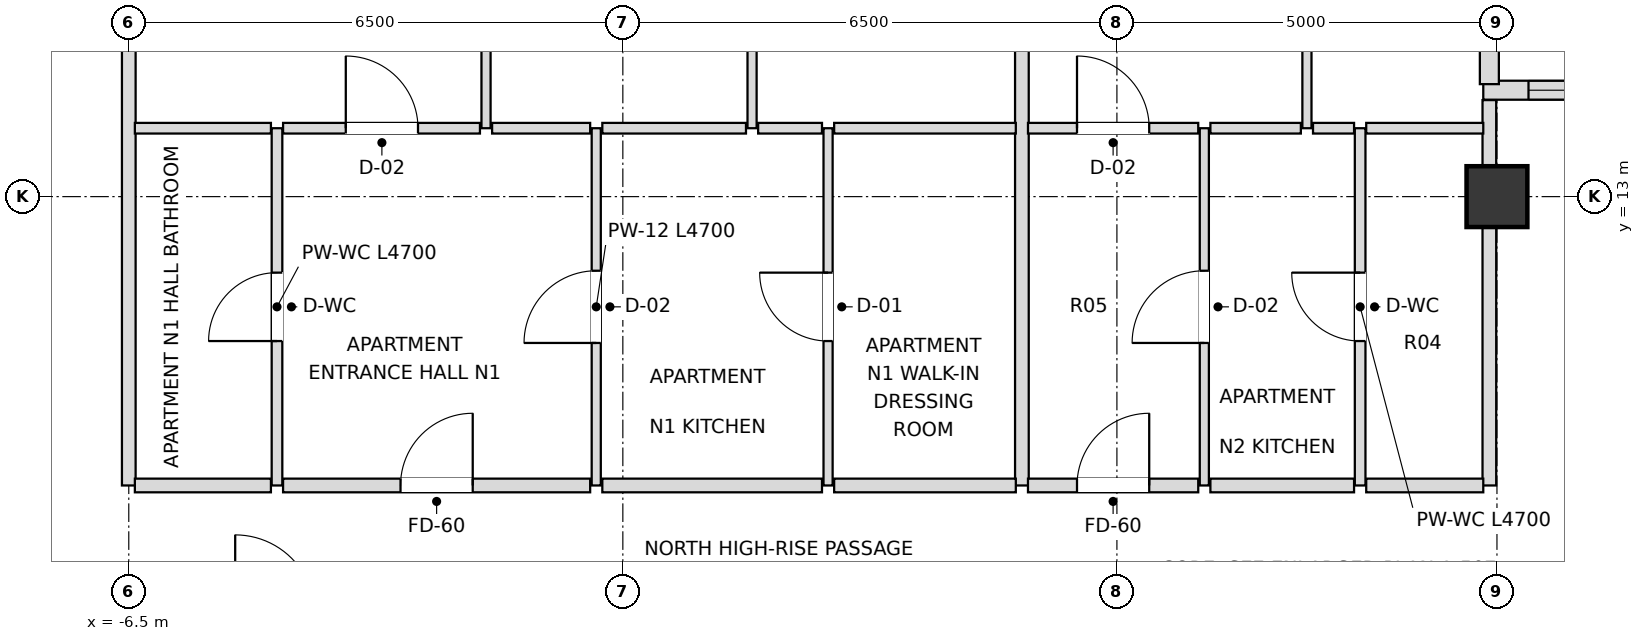
"""IFC4 building model, lengths in metres.
Left out: names, types, materials, properties, quantities, classifications, styles, units other than length and angle.
Written with IfcOpenShell. Run it as: python <this file> out.ifc"""

import sys

from ifc_helpers import new_model, si_unit, direction, frame, frame_2d, origin, origin_2d, place, context, subcontext, project, spatial, rectangle, extrude, element, fill, save


model = new_model("IFC4")
c1 = context("Model", 3, precision=1e-05, world=origin(), true_north=direction((0.0, 1.0)))
c2 = subcontext(c1, "Body", "Model", "MODEL_VIEW")
j1 = project(units=[si_unit("LENGTHUNIT", "METRE"), si_unit("PLANEANGLEUNIT", "RADIAN")], contexts=[c1])
p1 = place(None, origin())
s1 = spatial("IfcSite", under=j1, at=p1, CompositionType="ELEMENT")
p2 = place(p1, origin())
s2 = spatial("IfcBuilding", under=s1, at=p2, CompositionType="ELEMENT")
p3 = place(p2, frame((0.0, 0.0, 276.3)))
s3 = spatial("IfcBuildingStorey", under=s2, at=p3, CompositionType="ELEMENT", Elevation=276.3)
p4 = place(p3, frame((11.5, 13.0, 0.0), z_axis=(0.0, 0.0, 1.0), x_axis=(1.0, 0.0, 0.0)))
e1 = element("IfcColumn", 1, at=p4, inside=s3, PredefinedType="COLUMN", context=c2, shape_type="SweptSolid", body=[
    extrude(rectangle(XDim=0.8, YDim=0.8, at=origin_2d()), origin(), (0.0, 0.0, 1.0), 3.6),
])
p5 = place(p3, frame((16.98, 14.4, 0.0), z_axis=(0.0, 0.0, 1.0), x_axis=(-1.0, 0.0, 0.0)))
e2 = element("IfcWall", 2, at=p5, inside=s3, PredefinedType="SOLIDWALL", context=c2, shape_type="SweptSolid", body=[
    extrude(rectangle(XDim=5.66, YDim=0.25, at=frame_2d((2.83, 0.0))), origin(), (0.0, 0.0, 1.0), 2.748),
])
p6 = place(p5, frame((0.595, 0.0, 0.72)))
e3 = element("IfcOpeningElement", 3, at=p6, cuts=e2, PredefinedType="OPENING", context=c2, shape_type="SweptSolid", body=[
    extrude(rectangle(XDim=1.8, YDim=1.68, at=frame_2d((0.9, 0.84))), frame((0.0, 0.135, 0.0), z_axis=(0.0, -1.0, 0.0), x_axis=(1.0, 0.0, 0.0)), (0.0, 0.0, 1.0), 0.27),
])
p7 = place(p5, frame((3.265, 0.0, 0.72)))
e4 = element("IfcOpeningElement", 4, at=p7, cuts=e2, PredefinedType="OPENING", context=c2, shape_type="SweptSolid", body=[
    extrude(rectangle(XDim=1.8, YDim=1.68, at=frame_2d((0.9, 0.84))), frame((0.0, 0.135, 0.0), z_axis=(0.0, -1.0, 0.0), x_axis=(1.0, 0.0, 0.0)), (0.0, 0.0, 1.0), 0.27),
])
p8 = place(p3, frame((11.4, 14.48, 0.0), z_axis=(0.0, 0.0, 1.0), x_axis=(0.0, 1.0, 0.0)))
e5 = element("IfcWall", 5, at=p8, inside=s3, PredefinedType="SOLIDWALL", context=c2, shape_type="SweptSolid", body=[
    extrude(rectangle(XDim=5.34, YDim=0.25, at=frame_2d((2.67, 0.0))), origin(), (0.0, 0.0, 1.0), 2.748),
])
p9 = place(p8, frame((1.615, 0.0, 0.72)))
e6 = element("IfcOpeningElement", 6, at=p9, cuts=e5, PredefinedType="OPENING", context=c2, shape_type="SweptSolid", body=[
    extrude(rectangle(XDim=1.8, YDim=1.68, at=frame_2d((0.9, 0.84))), frame((0.0, 0.135, 0.0), z_axis=(0.0, -1.0, 0.0), x_axis=(1.0, 0.0, 0.0)), (0.0, 0.0, 1.0), 0.27),
])
p10 = place(p3, frame((-6.5, 9.2, 0.0), z_axis=(0.0, 0.0, 1.0), x_axis=(0.0, 1.0, 0.0)))
e7 = element("IfcWall", 7, at=p10, inside=s3, PredefinedType="PARTITIONING", context=c2, shape_type="SweptSolid", body=[
    extrude(rectangle(XDim=10.7, YDim=0.18, at=frame_2d((5.35, 0.0))), origin(), (0.0, 0.0, 1.0), 2.826),
])
p11 = place(p3, frame((-4.55, 9.2, 0.0), z_axis=(0.0, 0.0, 1.0), x_axis=(0.0, 1.0, 0.0)))
e8 = element("IfcWall", 8, at=p11, inside=s3, PredefinedType="PARTITIONING", context=c2, shape_type="SweptSolid", body=[
    extrude(rectangle(XDim=4.7, YDim=0.14, at=frame_2d((2.35, 0.0))), origin(), (0.0, 0.0, 1.0), 3.38),
])
p12 = place(p11, frame((1.9, 0.0, 0.0)))
e9 = element("IfcOpeningElement", 9, at=p12, cuts=e8, PredefinedType="OPENING", context=c2, shape_type="SweptSolid", body=[
    extrude(rectangle(XDim=0.9, YDim=2.1, at=frame_2d((0.45, 1.05))), frame((0.0, 0.08, 0.0), z_axis=(0.0, -1.0, 0.0), x_axis=(1.0, 0.0, 0.0)), (0.0, 0.0, 1.0), 0.16),
])
p13 = place(p3, frame((-1.8, 13.9, 0.0), z_axis=(0.0, 0.0, 1.0), x_axis=(0.0, 1.0, 0.0)))
e10 = element("IfcWall", 10, at=p13, inside=s3, PredefinedType="PARTITIONING", context=c2, shape_type="SweptSolid", body=[
    extrude(rectangle(XDim=6.0, YDim=0.12, at=frame_2d((3.0, 0.0))), origin(), (0.0, 0.0, 1.0), 3.018),
])
p14 = place(p13, frame((2.55, 0.0, 0.0)))
e11 = element("IfcOpeningElement", 11, at=p14, cuts=e10, PredefinedType="OPENING", context=c2, shape_type="SweptSolid", body=[
    extrude(rectangle(XDim=0.9, YDim=2.1, at=frame_2d((0.45, 1.05))), frame((0.0, 0.07, 0.0), z_axis=(0.0, -1.0, 0.0), x_axis=(1.0, 0.0, 0.0)), (0.0, 0.0, 1.0), 0.14),
])
p15 = place(p3, frame((-0.35, 9.2, 0.0), z_axis=(0.0, 0.0, 1.0), x_axis=(0.0, 1.0, 0.0)))
e12 = element("IfcWall", 12, at=p15, inside=s3, PredefinedType="PARTITIONING", context=c2, shape_type="SweptSolid", body=[
    extrude(rectangle(XDim=4.7, YDim=0.12, at=frame_2d((2.35, 0.0))), origin(), (0.0, 0.0, 1.0), 3.38),
])
p16 = place(p15, frame((1.875, 0.0, 0.0)))
e13 = element("IfcOpeningElement", 13, at=p16, cuts=e12, PredefinedType="OPENING", context=c2, shape_type="SweptSolid", body=[
    extrude(rectangle(XDim=0.95, YDim=2.1, at=frame_2d((0.475, 1.05))), frame((0.0, 0.07, 0.0), z_axis=(0.0, -1.0, 0.0), x_axis=(1.0, 0.0, 0.0)), (0.0, 0.0, 1.0), 0.14),
])
p17 = place(p3, frame((1.7, 13.9, 0.0), z_axis=(0.0, 0.0, 1.0), x_axis=(0.0, 1.0, 0.0)))
e14 = element("IfcWall", 14, at=p17, inside=s3, PredefinedType="PARTITIONING", context=c2, shape_type="SweptSolid", body=[
    extrude(rectangle(XDim=6.0, YDim=0.12, at=frame_2d((3.0, 0.0))), origin(), (0.0, 0.0, 1.0), 3.018),
])
p18 = place(p17, frame((2.55, 0.0, 0.0)))
e15 = element("IfcOpeningElement", 15, at=p18, cuts=e14, PredefinedType="OPENING", context=c2, shape_type="SweptSolid", body=[
    extrude(rectangle(XDim=0.9, YDim=2.1, at=frame_2d((0.45, 1.05))), frame((0.0, 0.07, 0.0), z_axis=(0.0, -1.0, 0.0), x_axis=(1.0, 0.0, 0.0)), (0.0, 0.0, 1.0), 0.14),
])
p19 = place(p3, frame((2.7, 9.2, 0.0), z_axis=(0.0, 0.0, 1.0), x_axis=(0.0, 1.0, 0.0)))
e16 = element("IfcWall", 16, at=p19, inside=s3, PredefinedType="PARTITIONING", context=c2, shape_type="SweptSolid", body=[
    extrude(rectangle(XDim=4.7, YDim=0.12, at=frame_2d((2.35, 0.0))), origin(), (0.0, 0.0, 1.0), 3.38),
])
p20 = place(p19, frame((1.9, 0.0, 0.0)))
e17 = element("IfcOpeningElement", 17, at=p20, cuts=e16, PredefinedType="OPENING", context=c2, shape_type="SweptSolid", body=[
    extrude(rectangle(XDim=0.9, YDim=2.1, at=frame_2d((0.45, 1.05))), frame((0.0, 0.07, 0.0), z_axis=(0.0, -1.0, 0.0), x_axis=(1.0, 0.0, 0.0)), (0.0, 0.0, 1.0), 0.14),
])
p21 = place(p3, frame((5.25, 9.2, 0.0), z_axis=(0.0, 0.0, 1.0), x_axis=(0.0, 1.0, 0.0)))
e18 = element("IfcWall", 18, at=p21, inside=s3, PredefinedType="PARTITIONING", context=c2, shape_type="SweptSolid", body=[
    extrude(rectangle(XDim=10.7, YDim=0.18, at=frame_2d((5.35, 0.0))), origin(), (0.0, 0.0, 1.0), 3.018),
])
p22 = place(p3, frame((7.65, 9.2, 0.0), z_axis=(0.0, 0.0, 1.0), x_axis=(0.0, 1.0, 0.0)))
e19 = element("IfcWall", 19, at=p22, inside=s3, PredefinedType="PARTITIONING", context=c2, shape_type="SweptSolid", body=[
    extrude(rectangle(XDim=4.7, YDim=0.12, at=frame_2d((2.35, 0.0))), origin(), (0.0, 0.0, 1.0), 2.826),
])
p23 = place(p22, frame((1.875, 0.0, 0.0)))
e20 = element("IfcOpeningElement", 20, at=p23, cuts=e19, PredefinedType="OPENING", context=c2, shape_type="SweptSolid", body=[
    extrude(rectangle(XDim=0.95, YDim=2.1, at=frame_2d((0.475, 1.05))), frame((0.0, 0.07, 0.0), z_axis=(0.0, -1.0, 0.0), x_axis=(1.0, 0.0, 0.0)), (0.0, 0.0, 1.0), 0.14),
])
p24 = place(p3, frame((9.0, 13.9, 0.0), z_axis=(0.0, 0.0, 1.0), x_axis=(0.0, 1.0, 0.0)))
e21 = element("IfcWall", 21, at=p24, inside=s3, PredefinedType="PARTITIONING", context=c2, shape_type="SweptSolid", body=[
    extrude(rectangle(XDim=6.0, YDim=0.12, at=frame_2d((3.0, 0.0))), origin(), (0.0, 0.0, 1.0), 3.38),
])
p25 = place(p24, frame((2.55, 0.0, 0.0)))
e22 = element("IfcOpeningElement", 22, at=p25, cuts=e21, PredefinedType="OPENING", context=c2, shape_type="SweptSolid", body=[
    extrude(rectangle(XDim=0.9, YDim=2.1, at=frame_2d((0.45, 1.05))), frame((0.0, 0.07, 0.0), z_axis=(0.0, -1.0, 0.0), x_axis=(1.0, 0.0, 0.0)), (0.0, 0.0, 1.0), 0.14),
])
p26 = place(p3, frame((9.7, 9.2, 0.0), z_axis=(0.0, 0.0, 1.0), x_axis=(0.0, 1.0, 0.0)))
e23 = element("IfcWall", 23, at=p26, inside=s3, PredefinedType="PARTITIONING", context=c2, shape_type="SweptSolid", body=[
    extrude(rectangle(XDim=4.7, YDim=0.14, at=frame_2d((2.35, 0.0))), origin(), (0.0, 0.0, 1.0), 2.826),
])
p27 = place(p26, frame((1.9, 0.0, 0.0)))
e24 = element("IfcOpeningElement", 24, at=p27, cuts=e23, PredefinedType="OPENING", context=c2, shape_type="SweptSolid", body=[
    extrude(rectangle(XDim=0.9, YDim=2.1, at=frame_2d((0.45, 1.05))), frame((0.0, 0.08, 0.0), z_axis=(0.0, -1.0, 0.0), x_axis=(1.0, 0.0, 0.0)), (0.0, 0.0, 1.0), 0.16),
])
p28 = place(p3, frame((11.4, 9.2, 0.0), z_axis=(0.0, 0.0, 1.0), x_axis=(0.0, 1.0, 0.0)))
e25 = element("IfcWall", 25, at=p28, inside=s3, PredefinedType="PARTITIONING", context=c2, shape_type="SweptSolid", body=[
    extrude(rectangle(XDim=5.07, YDim=0.18, at=frame_2d((2.535, 0.0))), origin(), (0.0, 0.0, 1.0), 2.748),
])
p29 = place(p3, frame((-6.42, 9.2, 0.0), z_axis=(0.0, 0.0, 1.0), x_axis=(1.0, 0.0, 0.0)))
e26 = element("IfcWall", 26, at=p29, inside=s3, PredefinedType="PARTITIONING", context=c2, shape_type="SweptSolid", body=[
    extrude(rectangle(XDim=1.79, YDim=0.18, at=frame_2d((0.895, 0.0))), origin(), (0.0, 0.0, 1.0), 3.38),
])
p30 = place(p3, frame((-4.47, 9.2, 0.0), z_axis=(0.0, 0.0, 1.0), x_axis=(1.0, 0.0, 0.0)))
e27 = element("IfcWall", 27, at=p30, inside=s3, PredefinedType="PARTITIONING", context=c2, shape_type="SweptSolid", body=[
    extrude(rectangle(XDim=4.04, YDim=0.18, at=frame_2d((2.02, 0.0))), origin(), (0.0, 0.0, 1.0), 3.38),
])
p31 = place(p30, frame((1.545, 0.0, 0.0)))
e28 = element("IfcOpeningElement", 28, at=p31, cuts=e27, PredefinedType="OPENING", context=c2, shape_type="SweptSolid", body=[
    extrude(rectangle(XDim=0.95, YDim=2.15, at=frame_2d((0.475, 1.075))), frame((0.0, 0.1, 0.0), z_axis=(0.0, -1.0, 0.0), x_axis=(1.0, 0.0, 0.0)), (0.0, 0.0, 1.0), 0.2),
])
p32 = place(p3, frame((-0.27, 9.2, 0.0), z_axis=(0.0, 0.0, 1.0), x_axis=(1.0, 0.0, 0.0)))
e29 = element("IfcWall", 29, at=p32, inside=s3, PredefinedType="PARTITIONING", context=c2, shape_type="SweptSolid", body=[
    extrude(rectangle(XDim=2.89, YDim=0.18, at=frame_2d((1.445, 0.0))), origin(), (0.0, 0.0, 1.0), 3.38),
])
p33 = place(p3, frame((2.78, 9.2, 0.0), z_axis=(0.0, 0.0, 1.0), x_axis=(1.0, 0.0, 0.0)))
e30 = element("IfcWall", 30, at=p33, inside=s3, PredefinedType="PARTITIONING", context=c2, shape_type="SweptSolid", body=[
    extrude(rectangle(XDim=2.39, YDim=0.18, at=frame_2d((1.195, 0.0))), origin(), (0.0, 0.0, 1.0), 3.38),
])
p34 = place(p3, frame((5.33, 9.2, 0.0), z_axis=(0.0, 0.0, 1.0), x_axis=(1.0, 0.0, 0.0)))
e31 = element("IfcWall", 31, at=p34, inside=s3, PredefinedType="PARTITIONING", context=c2, shape_type="SweptSolid", body=[
    extrude(rectangle(XDim=2.24, YDim=0.18, at=frame_2d((1.12, 0.0))), origin(), (0.0, 0.0, 1.0), 2.826),
])
p35 = place(p34, frame((0.645, 0.0, 0.0)))
e32 = element("IfcOpeningElement", 32, at=p35, cuts=e31, PredefinedType="OPENING", context=c2, shape_type="SweptSolid", body=[
    extrude(rectangle(XDim=0.95, YDim=2.15, at=frame_2d((0.475, 1.075))), frame((0.0, 0.1, 0.0), z_axis=(0.0, -1.0, 0.0), x_axis=(1.0, 0.0, 0.0)), (0.0, 0.0, 1.0), 0.2),
])
p36 = place(p3, frame((7.73, 9.2, 0.0), z_axis=(0.0, 0.0, 1.0), x_axis=(1.0, 0.0, 0.0)))
e33 = element("IfcWall", 33, at=p36, inside=s3, PredefinedType="PARTITIONING", context=c2, shape_type="SweptSolid", body=[
    extrude(rectangle(XDim=1.89, YDim=0.18, at=frame_2d((0.945, 0.0))), origin(), (0.0, 0.0, 1.0), 3.38),
])
p37 = place(p3, frame((9.78, 9.2, 0.0), z_axis=(0.0, 0.0, 1.0), x_axis=(1.0, 0.0, 0.0)))
e34 = element("IfcWall", 34, at=p37, inside=s3, PredefinedType="PARTITIONING", context=c2, shape_type="SweptSolid", body=[
    extrude(rectangle(XDim=1.54, YDim=0.18, at=frame_2d((0.77, 0.0))), origin(), (0.0, 0.0, 1.0), 3.38),
])
p38 = place(p3, frame((-6.42, 13.9, 0.0), z_axis=(0.0, 0.0, 1.0), x_axis=(1.0, 0.0, 0.0)))
e35 = element("IfcWall", 35, at=p38, inside=s3, PredefinedType="PARTITIONING", context=c2, shape_type="SweptSolid", body=[
    extrude(rectangle(XDim=1.79, YDim=0.14, at=frame_2d((0.895, 0.0))), origin(), (0.0, 0.0, 1.0), 3.38),
])
p39 = place(p3, frame((-4.47, 13.9, 0.0), z_axis=(0.0, 0.0, 1.0), x_axis=(1.0, 0.0, 0.0)))
e36 = element("IfcWall", 36, at=p39, inside=s3, PredefinedType="PARTITIONING", context=c2, shape_type="SweptSolid", body=[
    extrude(rectangle(XDim=2.59, YDim=0.14, at=frame_2d((1.295, 0.0))), origin(), (0.0, 0.0, 1.0), 3.38),
])
p40 = place(p39, frame((0.825, 0.0, 0.0)))
e37 = element("IfcOpeningElement", 37, at=p40, cuts=e36, PredefinedType="OPENING", context=c2, shape_type="SweptSolid", body=[
    extrude(rectangle(XDim=0.95, YDim=2.1, at=frame_2d((0.475, 1.05))), frame((0.0, 0.08, 0.0), z_axis=(0.0, -1.0, 0.0), x_axis=(1.0, 0.0, 0.0)), (0.0, 0.0, 1.0), 0.16),
])
p41 = place(p3, frame((-1.72, 13.9, 0.0), z_axis=(0.0, 0.0, 1.0), x_axis=(1.0, 0.0, 0.0)))
e38 = element("IfcWall", 38, at=p41, inside=s3, PredefinedType="PARTITIONING", context=c2, shape_type="SweptSolid", body=[
    extrude(rectangle(XDim=1.29, YDim=0.14, at=frame_2d((0.645, 0.0))), origin(), (0.0, 0.0, 1.0), 3.38),
])
p42 = place(p3, frame((-0.27, 13.9, 0.0), z_axis=(0.0, 0.0, 1.0), x_axis=(1.0, 0.0, 0.0)))
e39 = element("IfcWall", 39, at=p42, inside=s3, PredefinedType="PARTITIONING", context=c2, shape_type="SweptSolid", body=[
    extrude(rectangle(XDim=1.89, YDim=0.14, at=frame_2d((0.945, 0.0))), origin(), (0.0, 0.0, 1.0), 3.38),
])
p43 = place(p3, frame((1.78, 13.9, 0.0), z_axis=(0.0, 0.0, 1.0), x_axis=(1.0, 0.0, 0.0)))
e40 = element("IfcWall", 40, at=p43, inside=s3, PredefinedType="PARTITIONING", context=c2, shape_type="SweptSolid", body=[
    extrude(rectangle(XDim=0.84, YDim=0.14, at=frame_2d((0.42, 0.0))), origin(), (0.0, 0.0, 1.0), 3.38),
])
p44 = place(p3, frame((2.78, 13.9, 0.0), z_axis=(0.0, 0.0, 1.0), x_axis=(1.0, 0.0, 0.0)))
e41 = element("IfcWall", 41, at=p44, inside=s3, PredefinedType="PARTITIONING", context=c2, shape_type="SweptSolid", body=[
    extrude(rectangle(XDim=2.39, YDim=0.14, at=frame_2d((1.195, 0.0))), origin(), (0.0, 0.0, 1.0), 3.38),
])
p45 = place(p3, frame((5.33, 13.9, 0.0), z_axis=(0.0, 0.0, 1.0), x_axis=(1.0, 0.0, 0.0)))
e42 = element("IfcWall", 42, at=p45, inside=s3, PredefinedType="PARTITIONING", context=c2, shape_type="SweptSolid", body=[
    extrude(rectangle(XDim=2.24, YDim=0.14, at=frame_2d((1.12, 0.0))), origin(), (0.0, 0.0, 1.0), 2.826),
])
p46 = place(p45, frame((0.645, 0.0, 0.0)))
e43 = element("IfcOpeningElement", 43, at=p46, cuts=e42, PredefinedType="OPENING", context=c2, shape_type="SweptSolid", body=[
    extrude(rectangle(XDim=0.95, YDim=2.1, at=frame_2d((0.475, 1.05))), frame((0.0, 0.08, 0.0), z_axis=(0.0, -1.0, 0.0), x_axis=(1.0, 0.0, 0.0)), (0.0, 0.0, 1.0), 0.16),
])
p47 = place(p3, frame((7.73, 13.9, 0.0), z_axis=(0.0, 0.0, 1.0), x_axis=(1.0, 0.0, 0.0)))
e44 = element("IfcWall", 44, at=p47, inside=s3, PredefinedType="PARTITIONING", context=c2, shape_type="SweptSolid", body=[
    extrude(rectangle(XDim=1.19, YDim=0.14, at=frame_2d((0.595, 0.0))), origin(), (0.0, 0.0, 1.0), 3.38),
])
p48 = place(p3, frame((9.08, 13.9, 0.0), z_axis=(0.0, 0.0, 1.0), x_axis=(1.0, 0.0, 0.0)))
e45 = element("IfcWall", 45, at=p48, inside=s3, PredefinedType="PARTITIONING", context=c2, shape_type="SweptSolid", body=[
    extrude(rectangle(XDim=0.54, YDim=0.14, at=frame_2d((0.27, 0.0))), origin(), (0.0, 0.0, 1.0), 3.38),
])
p49 = place(p3, frame((9.78, 13.9, 0.0), z_axis=(0.0, 0.0, 1.0), x_axis=(1.0, 0.0, 0.0)))
e46 = element("IfcWall", 46, at=p49, inside=s3, PredefinedType="PARTITIONING", context=c2, shape_type="SweptSolid", body=[
    extrude(rectangle(XDim=1.54, YDim=0.14, at=frame_2d((0.77, 0.0))), origin(), (0.0, 0.0, 1.0), 3.38),
])
p50 = place(p7, origin())
e47 = element("IfcWindow", 47, at=p50, inside=s3, PartitioningType="SINGLE_PANEL", PredefinedType="WINDOW", context=c2, shape_type="SweptSolid", body=[
    extrude(rectangle(XDim=1.8, YDim=1.68, at=frame_2d((0.9, 0.84))), frame((0.0, 0.03, 0.0), z_axis=(0.0, -1.0, 0.0), x_axis=(1.0, 0.0, 0.0)), (0.0, 0.0, 1.0), 0.06),
])
fill(e4, e47)
p51 = place(p12, origin())
e48 = element("IfcDoor", 48, at=p51, inside=s3, OperationType="SINGLE_SWING_LEFT", PredefinedType="DOOR", context=c2, shape_type="SweptSolid", body=[
    extrude(rectangle(XDim=0.9, YDim=2.1, at=frame_2d((0.45, 1.05))), frame((0.0, 0.025, 0.0), z_axis=(0.0, -1.0, 0.0), x_axis=(1.0, 0.0, 0.0)), (0.0, 0.0, 1.0), 0.05),
])
fill(e9, e48)
p52 = place(p31, origin())
e49 = element("IfcDoor", 49, at=p52, inside=s3, OperationType="SINGLE_SWING_RIGHT", PredefinedType="DOOR", context=c2, shape_type="SweptSolid", body=[
    extrude(rectangle(XDim=0.95, YDim=2.15, at=frame_2d((0.475, 1.075))), frame((0.0, 0.025, 0.0), z_axis=(0.0, -1.0, 0.0), x_axis=(1.0, 0.0, 0.0)), (0.0, 0.0, 1.0), 0.05),
])
fill(e28, e49)
p53 = place(p16, origin())
e50 = element("IfcDoor", 50, at=p53, inside=s3, OperationType="SINGLE_SWING_LEFT", PredefinedType="DOOR", context=c2, shape_type="SweptSolid", body=[
    extrude(rectangle(XDim=0.95, YDim=2.1, at=frame_2d((0.475, 1.05))), frame((0.0, 0.025, 0.0), z_axis=(0.0, -1.0, 0.0), x_axis=(1.0, 0.0, 0.0)), (0.0, 0.0, 1.0), 0.05),
])
fill(e13, e50)
p54 = place(p20, origin())
e51 = element("IfcDoor", 51, at=p54, inside=s3, OperationType="SINGLE_SWING_RIGHT", PredefinedType="DOOR", context=c2, shape_type="SweptSolid", body=[
    extrude(rectangle(XDim=0.9, YDim=2.1, at=frame_2d((0.45, 1.05))), frame((0.0, 0.025, 0.0), z_axis=(0.0, -1.0, 0.0), x_axis=(1.0, 0.0, 0.0)), (0.0, 0.0, 1.0), 0.05),
])
fill(e17, e51)
p55 = place(p40, origin())
e52 = element("IfcDoor", 52, at=p55, inside=s3, OperationType="SINGLE_SWING_LEFT", PredefinedType="DOOR", context=c2, shape_type="SweptSolid", body=[
    extrude(rectangle(XDim=0.95, YDim=2.1, at=frame_2d((0.475, 1.05))), frame((0.0, 0.025, 0.0), z_axis=(0.0, -1.0, 0.0), x_axis=(1.0, 0.0, 0.0)), (0.0, 0.0, 1.0), 0.05),
])
fill(e37, e52)
p56 = place(p35, origin())
e53 = element("IfcDoor", 53, at=p56, inside=s3, OperationType="SINGLE_SWING_RIGHT", PredefinedType="DOOR", context=c2, shape_type="SweptSolid", body=[
    extrude(rectangle(XDim=0.95, YDim=2.15, at=frame_2d((0.475, 1.075))), frame((0.0, 0.025, 0.0), z_axis=(0.0, -1.0, 0.0), x_axis=(1.0, 0.0, 0.0)), (0.0, 0.0, 1.0), 0.05),
])
fill(e32, e53)
p57 = place(p23, origin())
e54 = element("IfcDoor", 54, at=p57, inside=s3, OperationType="SINGLE_SWING_LEFT", PredefinedType="DOOR", context=c2, shape_type="SweptSolid", body=[
    extrude(rectangle(XDim=0.95, YDim=2.1, at=frame_2d((0.475, 1.05))), frame((0.0, 0.025, 0.0), z_axis=(0.0, -1.0, 0.0), x_axis=(1.0, 0.0, 0.0)), (0.0, 0.0, 1.0), 0.05),
])
fill(e20, e54)
p58 = place(p27, origin())
e55 = element("IfcDoor", 55, at=p58, inside=s3, OperationType="SINGLE_SWING_RIGHT", PredefinedType="DOOR", context=c2, shape_type="SweptSolid", body=[
    extrude(rectangle(XDim=0.9, YDim=2.1, at=frame_2d((0.45, 1.05))), frame((0.0, 0.025, 0.0), z_axis=(0.0, -1.0, 0.0), x_axis=(1.0, 0.0, 0.0)), (0.0, 0.0, 1.0), 0.05),
])
fill(e24, e55)
p59 = place(p46, origin())
e56 = element("IfcDoor", 56, at=p59, inside=s3, OperationType="SINGLE_SWING_LEFT", PredefinedType="DOOR", context=c2, shape_type="SweptSolid", body=[
    extrude(rectangle(XDim=0.95, YDim=2.1, at=frame_2d((0.475, 1.05))), frame((0.0, 0.025, 0.0), z_axis=(0.0, -1.0, 0.0), x_axis=(1.0, 0.0, 0.0)), (0.0, 0.0, 1.0), 0.05),
])
fill(e43, e56)
save(model, sys.argv[1])
